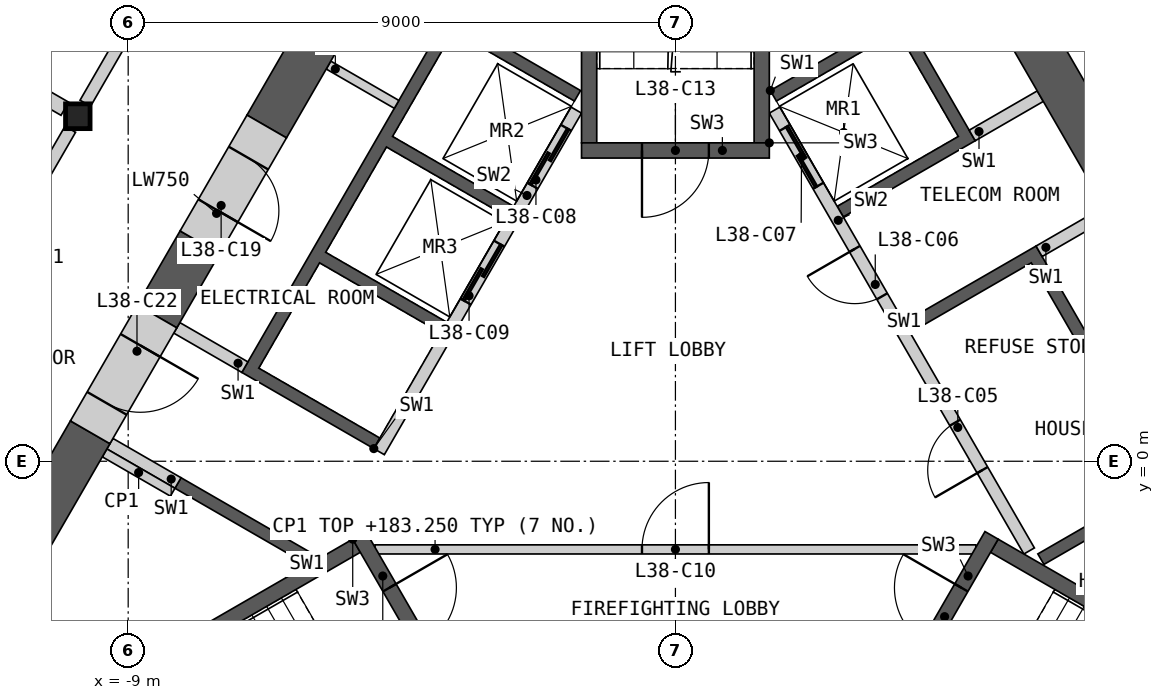
"""IFC4 building model, lengths in metres.
Left out: names, types, materials, properties, quantities, classifications, styles, units other than length and angle.
Written with IfcOpenShell. Run it as: python <this file> out.ifc"""

import sys

from ifc_helpers import new_model, si_unit, direction, frame, frame_2d, origin, origin_2d, place, context, subcontext, project, spatial, polyline, rectangle, i_section, outline, extrude, element, fill, save


model = new_model("IFC4")
c1 = context("Model", 3, precision=1e-05, world=origin(), true_north=direction((0.0, 1.0)))
c2 = subcontext(c1, "Body", "Model", "MODEL_VIEW")
j1 = project(units=[si_unit("LENGTHUNIT", "METRE"), si_unit("PLANEANGLEUNIT", "RADIAN")], contexts=[c1])
p1 = place(None, origin())
s1 = spatial("IfcSite", under=j1, at=p1, CompositionType="ELEMENT")
p2 = place(p1, origin())
s2 = spatial("IfcBuilding", under=s1, at=p2, CompositionType="ELEMENT")
p3 = place(p2, frame((0.0, 0.0, 180.0)))
s3 = spatial("IfcBuildingStorey", under=s2, at=p3, CompositionType="ELEMENT", Elevation=180.0)
p4 = place(p3, frame((-9.828, 5.675, 0.0), z_axis=(0.0, 0.0, 1.0), x_axis=(1.0, 0.0, 0.0)))
e1 = element("IfcColumn", 1, at=p4, inside=s3, PredefinedType="COLUMN", context=c2, shape_type="SweptSolid", body=[
    extrude(i_section(OverallWidth=0.404, OverallDepth=0.407, WebThickness=0.027, FlangeThickness=0.044, at=origin_2d()), origin(), (0.0, 0.0, 1.0), 3.6),
])
p5 = place(p3, origin())
e2 = element("IfcWall", 2, at=p5, inside=s3, PredefinedType="SHEAR", context=c2, shape_type="SweptSolid", body=[
    extrude(outline(polyline([(1.561, 6.097), (3.731, 7.35), (4.931, 5.272), (2.76, 4.019), (2.66, 4.192), (4.652, 5.342), (3.652, 7.074), (1.66, 5.924), (1.561, 6.097)])), origin(), (0.0, 0.0, 1.0), 3.25),
])
p6 = place(p3, origin())
e3 = element("IfcWall", 3, at=p6, inside=s3, PredefinedType="SHEAR", context=c2, shape_type="SweptSolid", body=[
    extrude(outline(polyline([(3.76, 2.287), (5.931, 3.54), (8.231, -0.444), (6.061, -1.697), (5.96, -1.524), (7.952, -0.374), (5.852, 3.263), (3.861, 2.113), (3.76, 2.287)])), origin(), (0.0, 0.0, 1.0), 3.25),
])
p7 = place(p3, frame((5.817, -1.476, 0.0), z_axis=(0.0, 0.0, 1.0), x_axis=(-0.500002616675, 0.866023893041, 0.0)))
e4 = element("IfcWall", 4, at=p7, inside=s3, PredefinedType="SOLIDWALL", context=c2, shape_type="SweptSolid", body=[
    extrude(rectangle(XDim=8.373, YDim=0.2, at=frame_2d((4.187, 0.0))), origin(), (0.0, 0.0, 1.0), 3.25),
])
p8 = place(p7, frame((1.537, 0.0, 0.0)))
e5 = element("IfcOpeningElement", 5, at=p8, cuts=e4, PredefinedType="OPENING", context=c2, shape_type="SweptSolid", body=[
    extrude(rectangle(XDim=0.9, YDim=2.1, at=frame_2d((0.45, 1.05))), frame((0.0, 0.11, 0.0), z_axis=(0.0, -1.0, 0.0), x_axis=(1.0, 0.0, 0.0)), (0.0, 0.0, 1.0), 0.22),
])
p9 = place(p7, frame((4.837, 0.0, 0.0)))
e6 = element("IfcOpeningElement", 6, at=p9, cuts=e4, PredefinedType="OPENING", context=c2, shape_type="SweptSolid", body=[
    extrude(rectangle(XDim=0.9, YDim=2.1, at=frame_2d((0.45, 1.05))), frame((0.0, 0.11, 0.0), z_axis=(0.0, -1.0, 0.0), x_axis=(1.0, 0.0, 0.0)), (0.0, 0.0, 1.0), 0.22),
])
p10 = place(p7, frame((6.937, 0.0, 0.0)))
e7 = element("IfcOpeningElement", 7, at=p10, cuts=e4, PredefinedType="OPENING", context=c2, shape_type="SweptSolid", body=[
    extrude(rectangle(XDim=1.1, YDim=2.1, at=frame_2d((0.55, 1.05))), frame((0.0, 0.11, 0.0), z_axis=(0.0, -1.0, 0.0), x_axis=(1.0, 0.0, 0.0)), (0.0, 0.0, 1.0), 0.22),
])
p11 = place(p3, frame((5.981, 3.453, 0.0), z_axis=(0.0, 0.0, 1.0), x_axis=(0.865968639725, 0.500098305348, 0.0)))
e8 = element("IfcWall", 8, at=p11, inside=s3, PredefinedType="SHEAR", context=c2, shape_type="SweptSolid", body=[
    extrude(rectangle(XDim=1.293, YDim=0.2, at=frame_2d((0.646, 0.0))), origin(), (0.0, 0.0, 1.0), 3.25),
])
p12 = place(p3, frame((4.881, 5.358, 0.0), z_axis=(0.0, 0.0, 1.0), x_axis=(0.866084958089, 0.499896834728, 0.0)))
e9 = element("IfcWall", 9, at=p12, inside=s3, PredefinedType="SHEAR", context=c2, shape_type="SweptSolid", body=[
    extrude(rectangle(XDim=1.293, YDim=0.2, at=frame_2d((0.646, 0.0))), origin(), (0.0, 0.0, 1.0), 3.25),
])
p13 = place(p3, origin())
e10 = element("IfcWall", 10, at=p13, inside=s3, PredefinedType="SHEAR", context=c2, shape_type="SweptSolid", body=[
    extrude(outline(polyline([(-6.061, -1.697), (-8.231, -0.444), (-8.131, -0.271), (-5.96, -1.524), (-6.061, -1.697)])), origin(), (0.0, 0.0, 1.0), 3.25),
])
p14 = place(p3, origin())
e11 = element("IfcWall", 11, at=p14, inside=s3, PredefinedType="SHEAR", context=c2, shape_type="SweptSolid", body=[
    extrude(outline(polyline([(-4.96, 0.208), (-7.131, 1.461), (-3.731, 7.35), (-1.561, 6.097), (-1.66, 5.924), (-3.652, 7.074), (-4.652, 5.342), (-2.66, 4.192), (-2.76, 4.019), (-4.752, 5.169), (-5.752, 3.437), (-3.76, 2.287), (-3.861, 2.113), (-5.852, 3.263), (-6.852, 1.531), (-4.861, 0.381), (-4.96, 0.208)])), origin(), (0.0, 0.0, 1.0), 3.25),
])
p15 = place(p3, frame((-1.631, 5.776, 0.0), z_axis=(0.0, 0.0, 1.0), x_axis=(-0.499992876559, -0.866029516466, 0.0)))
e12 = element("IfcWall", 12, at=p15, inside=s3, PredefinedType="SOLIDWALL", context=c2, shape_type="SweptSolid", body=[
    extrude(rectangle(XDim=6.486, YDim=0.2, at=frame_2d((3.243, 0.0))), origin(), (0.0, 0.0, 1.0), 3.25),
])
p16 = place(p15, frame((0.337, 0.0, 0.0)))
e13 = element("IfcOpeningElement", 13, at=p16, cuts=e12, PredefinedType="OPENING", context=c2, shape_type="SweptSolid", body=[
    extrude(rectangle(XDim=1.1, YDim=2.1, at=frame_2d((0.55, 1.05))), frame((0.0, 0.11, 0.0), z_axis=(0.0, -1.0, 0.0), x_axis=(1.0, 0.0, 0.0)), (0.0, 0.0, 1.0), 0.22),
])
p17 = place(p15, frame((2.537, 0.0, 0.0)))
e14 = element("IfcOpeningElement", 14, at=p17, cuts=e12, PredefinedType="OPENING", context=c2, shape_type="SweptSolid", body=[
    extrude(rectangle(XDim=1.1, YDim=2.1, at=frame_2d((0.55, 1.05))), frame((0.0, 0.11, 0.0), z_axis=(0.0, -1.0, 0.0), x_axis=(1.0, 0.0, 0.0)), (0.0, 0.0, 1.0), 0.22),
])
for number, where, z_axis, x_axis in (
    (15, (-7.081, 1.548, 0.0), (0.0, 0.0, 1.0), (-0.866, 0.5, 0.0)),
    (16, (-8.181, -0.357, 0.0), (0.0, 0.0, 1.0), (-0.866, 0.5, 0.0)),
):
    element("IfcWall", number, at=place(p3, frame(where, z_axis=z_axis, x_axis=x_axis)), inside=s3, PredefinedType="SHEAR", context=c2, shape_type="SweptSolid", body=[
        extrude(rectangle(XDim=1.293, YDim=0.2, at=frame_2d((0.646, 0.0))), origin(), (0.0, 0.0, 1.0), 3.25),
    ])
p18 = place(p3, frame((-4.941, -1.45, 0.0), z_axis=(0.0, 0.0, 1.0), x_axis=(1.0, 0.0, 0.0)))
e17 = element("IfcWall", 17, at=p18, inside=s3, PredefinedType="PARTITIONING", context=c2, shape_type="SweptSolid", body=[
    extrude(rectangle(XDim=9.882, YDim=0.15, at=frame_2d((4.941, 0.0))), origin(), (0.0, 0.0, 1.0), 3.25),
])
p19 = place(p18, frame((4.391, 0.0, 0.0)))
e18 = element("IfcOpeningElement", 18, at=p19, cuts=e17, PredefinedType="OPENING", context=c2, shape_type="SweptSolid", body=[
    extrude(rectangle(XDim=1.1, YDim=2.1, at=frame_2d((0.55, 1.05))), frame((0.0, 0.085, 0.0), z_axis=(0.0, -1.0, 0.0), x_axis=(1.0, 0.0, 0.0)), (0.0, 0.0, 1.0), 0.17),
])
p20 = place(p3, origin())
e19 = element("IfcWall", 19, at=p20, inside=s3, PredefinedType="SHEAR", context=c2, shape_type="SweptSolid", body=[
    extrude(outline(polyline([(-5.307, -1.281), (-10.374, -4.206), (-10.032, -4.298), (-5.182, -1.498), (-5.307, -1.281)])), origin(), (0.0, 0.0, 1.0), 3.25),
])
p21 = place(p3, frame((-5.199, -1.219, 0.0), z_axis=(0.0, 0.0, 1.0), x_axis=(0.499982516597, -0.866035497597, 0.0)))
e20 = element("IfcWall", 20, at=p21, inside=s3, PredefinedType="SHEAR", context=c2, shape_type="SweptSolid", body=[
    extrude(rectangle(XDim=3.088, YDim=0.25, at=frame_2d((1.544, 0.0))), origin(), (0.0, 0.0, 1.0), 3.25),
])
p22 = place(p21, frame((0.994, 0.0, 0.0)))
e21 = element("IfcOpeningElement", 21, at=p22, cuts=e20, PredefinedType="OPENING", context=c2, shape_type="SweptSolid", body=[
    extrude(rectangle(XDim=1.1, YDim=2.1, at=frame_2d((0.55, 1.05))), frame((0.0, 0.135, 0.0), z_axis=(0.0, -1.0, 0.0), x_axis=(1.0, 0.0, 0.0)), (0.0, 0.0, 1.0), 0.27),
])
p23 = place(p3, origin())
e22 = element("IfcWall", 22, at=p23, inside=s3, PredefinedType="SHEAR", context=c2, shape_type="SweptSolid", body=[
    extrude(outline(polyline([(10.032, -4.298), (10.374, -4.206), (5.307, -1.281), (5.182, -1.498), (10.032, -4.298)])), origin(), (0.0, 0.0, 1.0), 3.25),
])
p24 = place(p3, frame((3.655, -3.893, 0.0), z_axis=(0.0, 0.0, 1.0), x_axis=(0.499982516597, 0.866035497597, 0.0)))
e23 = element("IfcWall", 23, at=p24, inside=s3, PredefinedType="SHEAR", context=c2, shape_type="SweptSolid", body=[
    extrude(rectangle(XDim=3.088, YDim=0.25, at=frame_2d((1.544, 0.0))), origin(), (0.0, 0.0, 1.0), 3.25),
])
p25 = place(p24, frame((0.994, 0.0, 0.0)))
e24 = element("IfcOpeningElement", 24, at=p25, cuts=e23, PredefinedType="OPENING", context=c2, shape_type="SweptSolid", body=[
    extrude(rectangle(XDim=1.1, YDim=2.1, at=frame_2d((0.55, 1.05))), frame((0.0, 0.135, 0.0), z_axis=(0.0, -1.0, 0.0), x_axis=(1.0, 0.0, 0.0)), (0.0, 0.0, 1.0), 0.27),
])
p26 = place(p3, origin())
e25 = element("IfcWall", 25, at=p26, inside=s3, PredefinedType="SHEAR", context=c2, shape_type="SweptSolid", body=[
    extrude(outline(polyline([(1.544, 5.237), (1.544, 11.087), (1.294, 10.837), (1.294, 5.237), (1.544, 5.237)])), origin(), (0.0, 0.0, 1.0), 3.25),
])
p27 = place(p3, origin())
e26 = element("IfcWall", 26, at=p27, inside=s3, PredefinedType="SHEAR", context=c2, shape_type="SweptSolid", body=[
    extrude(outline(polyline([(-1.294, 10.837), (-1.544, 11.087), (-1.544, 5.237), (-1.294, 5.237), (-1.294, 10.837)])), origin(), (0.0, 0.0, 1.0), 3.25),
])
p28 = place(p3, frame((1.544, 5.112, 0.0), z_axis=(0.0, 0.0, 1.0), x_axis=(-1.0, 0.0, 0.0)))
e27 = element("IfcWall", 27, at=p28, inside=s3, PredefinedType="SHEAR", context=c2, shape_type="SweptSolid", body=[
    extrude(rectangle(XDim=3.088, YDim=0.25, at=frame_2d((1.544, 0.0))), origin(), (0.0, 0.0, 1.0), 3.25),
])
p29 = place(p28, frame((0.994, 0.0, 0.0)))
e28 = element("IfcOpeningElement", 28, at=p29, cuts=e27, PredefinedType="OPENING", context=c2, shape_type="SweptSolid", body=[
    extrude(rectangle(XDim=1.1, YDim=2.1, at=frame_2d((0.55, 1.05))), frame((0.0, 0.135, 0.0), z_axis=(0.0, -1.0, 0.0), x_axis=(1.0, 0.0, 0.0)), (0.0, 0.0, 1.0), 0.27),
])
for number, where, z_axis, x_axis in (
    (29, (-8.268, -0.509, 0.0), (0.0, 0.0, 1.0), (-0.866, 0.5, 0.0)),
    (30, (-5.705, 6.516, 0.0), (0.0, 0.0, 1.0), (0.866, -0.5, 0.0)),
):
    element("IfcWall", number, at=place(p3, frame(where, z_axis=z_axis, x_axis=x_axis)), inside=s3, PredefinedType="PARTITIONING", context=c2, shape_type="SweptSolid", body=[
        extrude(rectangle(XDim=1.293, YDim=0.15, at=frame_2d((0.646, 0.0))), origin(), (0.0, 0.0, 1.0), 3.25),
    ])
p30 = place(p3, frame((7.964, 3.354, 0.0), z_axis=(0.0, 0.0, 1.0), x_axis=(-0.50002928721, 0.866008494146, 0.0)))
e31 = element("IfcWall", 31, at=p30, inside=s3, PredefinedType="SHEAR", context=c2, shape_type="SweptSolid", body=[
    extrude(rectangle(XDim=6.405, YDim=0.75, at=frame_2d((3.203, 0.0))), origin(), (0.0, 0.0, 1.0), 3.25),
])
p31 = place(p3, frame((-9.625, 0.477, 0.0), z_axis=(0.0, 0.0, 1.0), x_axis=(-0.499986234705, -0.866033351035, 0.0)))
e32 = element("IfcWall", 32, at=p31, inside=s3, PredefinedType="SHEAR", context=c2, shape_type="SweptSolid", body=[
    extrude(rectangle(XDim=9.801, YDim=0.75, at=frame_2d((4.9, 0.0))), origin(), (0.0, 0.0, 1.0), 3.25),
])
p32 = place(p3, frame((-2.622, 12.606, 0.0), z_axis=(0.0, 0.0, 1.0), x_axis=(-0.500014611105, -0.866016967894, 0.0)))
e33 = element("IfcWall", 33, at=p32, inside=s3, PredefinedType="SHEAR", context=c2, shape_type="SweptSolid", body=[
    extrude(rectangle(XDim=8.198, YDim=0.75, at=frame_2d((4.099, 0.0))), origin(), (0.0, 0.0, 1.0), 3.25),
])
p33 = place(p3, frame((-7.821, 3.601, 0.0), z_axis=(0.0, 0.0, 1.0), x_axis=(-0.49996263964, -0.866046972724, 0.0)))
e34 = element("IfcWall", 34, at=p33, inside=s3, PredefinedType="SHEAR", context=c2, shape_type="SweptSolid", body=[
    extrude(rectangle(XDim=1.408, YDim=0.75, at=frame_2d((0.704, 0.0))), origin(), (0.0, 0.0, 1.0), 3.25),
])
p34 = place(p3, frame((-6.721, 5.506, 0.0), z_axis=(0.0, 0.0, 1.0), x_axis=(-0.499946605688, -0.86605622881, 0.0)))
e35 = element("IfcWall", 35, at=p34, inside=s3, PredefinedType="SHEAR", context=c2, shape_type="SweptSolid", body=[
    extrude(rectangle(XDim=2.2, YDim=0.75, at=frame_2d((1.1, 0.0))), origin(), (0.0, 0.0, 1.0), 3.25),
])
p35 = place(p34, frame((0.6, 0.0, 0.0)))
e36 = element("IfcOpeningElement", 36, at=p35, cuts=e35, PredefinedType="OPENING", context=c2, shape_type="SweptSolid", body=[
    extrude(rectangle(XDim=1.0, YDim=2.1, at=frame_2d((0.5, 1.05))), frame((0.0, 0.385, 0.0), z_axis=(0.0, -1.0, 0.0), x_axis=(1.0, 0.0, 0.0)), (0.0, 0.0, 1.0), 0.77),
])
p36 = place(p3, frame((-8.525, 2.382, 0.0), z_axis=(0.0, 0.0, 1.0), x_axis=(-0.500077893725, -0.86598042715, 0.0)))
e37 = element("IfcWall", 37, at=p36, inside=s3, PredefinedType="SHEAR", context=c2, shape_type="SweptSolid", body=[
    extrude(rectangle(XDim=2.2, YDim=0.75, at=frame_2d((1.1, 0.0))), origin(), (0.0, 0.0, 1.0), 3.25),
])
p37 = place(p36, frame((0.55, 0.0, 0.0)))
e38 = element("IfcOpeningElement", 38, at=p37, cuts=e37, PredefinedType="OPENING", context=c2, shape_type="SweptSolid", body=[
    extrude(rectangle(XDim=1.1, YDim=2.1, at=frame_2d((0.55, 1.05))), frame((0.0, 0.385, 0.0), z_axis=(0.0, -1.0, 0.0), x_axis=(1.0, 0.0, 0.0)), (0.0, 0.0, 1.0), 0.77),
])
p38 = place(p3, frame((5.377, 19.385, 0.0), z_axis=(0.0, 0.0, 1.0), x_axis=(0.500000757641, -0.86602496636, 0.0)))
e39 = element("IfcWall", 39, at=p38, inside=s3, PredefinedType="PARTITIONING", context=c2, shape_type="SweptSolid", body=[
    extrude(rectangle(XDim=28.198, YDim=0.2, at=frame_2d((14.099, 0.0))), origin(), (0.0, 0.0, 1.0), 3.25),
])
p39 = place(p38, frame((22.735, 0.0, 0.0)))
e40 = element("IfcOpeningElement", 40, at=p39, cuts=e39, PredefinedType="OPENING", context=c2, shape_type="SweptSolid", body=[
    extrude(rectangle(XDim=1.8, YDim=2.1, at=frame_2d((0.9, 1.05))), frame((0.0, 0.11, 0.0), z_axis=(0.0, -1.0, 0.0), x_axis=(1.0, 0.0, 0.0)), (0.0, 0.0, 1.0), 0.22),
])
p40 = place(p38, frame((14.402, 0.0, 0.0)))
e41 = element("IfcOpeningElement", 41, at=p40, cuts=e39, PredefinedType="OPENING", context=c2, shape_type="SweptSolid", body=[
    extrude(rectangle(XDim=1.0, YDim=2.1, at=frame_2d((0.5, 1.05))), frame((0.0, 0.11, 0.0), z_axis=(0.0, -1.0, 0.0), x_axis=(1.0, 0.0, 0.0)), (0.0, 0.0, 1.0), 0.22),
])
p41 = place(p38, frame((12.796, 0.0, 0.0)))
e42 = element("IfcOpeningElement", 42, at=p41, cuts=e39, PredefinedType="OPENING", context=c2, shape_type="SweptSolid", body=[
    extrude(rectangle(XDim=1.0, YDim=2.1, at=frame_2d((0.5, 1.05))), frame((0.0, 0.11, 0.0), z_axis=(0.0, -1.0, 0.0), x_axis=(1.0, 0.0, 0.0)), (0.0, 0.0, 1.0), 0.22),
])
p42 = place(p38, frame((4.164, 0.0, 0.0)))
e43 = element("IfcOpeningElement", 43, at=p42, cuts=e39, PredefinedType="OPENING", context=c2, shape_type="SweptSolid", body=[
    extrude(rectangle(XDim=1.0, YDim=2.1, at=frame_2d((0.5, 1.05))), frame((0.0, 0.11, 0.0), z_axis=(0.0, -1.0, 0.0), x_axis=(1.0, 0.0, 0.0)), (0.0, 0.0, 1.0), 0.22),
])
p43 = place(p38, frame((1.452, 0.0, 0.0)))
e44 = element("IfcOpeningElement", 44, at=p43, cuts=e39, PredefinedType="OPENING", context=c2, shape_type="SweptSolid", body=[
    extrude(rectangle(XDim=0.95, YDim=2.1, at=frame_2d((0.475, 1.05))), frame((0.0, 0.11, 0.0), z_axis=(0.0, -1.0, 0.0), x_axis=(1.0, 0.0, 0.0)), (0.0, 0.0, 1.0), 0.22),
])
p44 = place(p3, frame((-21.0, 12.124, 0.0), z_axis=(0.0, 0.0, 1.0), x_axis=(0.866025883649, -0.499999168849, 0.0)))
e45 = element("IfcWall", 45, at=p44, inside=s3, PredefinedType="PARTITIONING", context=c2, shape_type="SweptSolid", body=[
    extrude(rectangle(XDim=12.652, YDim=0.25, at=frame_2d((6.326, 0.0))), origin(), (0.0, 0.0, 1.0), 2.404),
])
p45 = place(p3, frame((-9.705, 5.888, 0.0), z_axis=(0.0, 0.0, 1.0), x_axis=(0.50000393355, 0.866023132736, 0.0)))
e46 = element("IfcWall", 46, at=p45, inside=s3, PredefinedType="PARTITIONING", context=c2, shape_type="SweptSolid", body=[
    extrude(rectangle(XDim=9.335, YDim=0.2, at=frame_2d((4.667, 0.0))), origin(), (0.0, 0.0, 1.0), 3.25),
])
p46 = place(p45, frame((5.172, 0.0, 0.0)))
e47 = element("IfcOpeningElement", 47, at=p46, cuts=e46, PredefinedType="OPENING", context=c2, shape_type="SweptSolid", body=[
    extrude(rectangle(XDim=1.0, YDim=2.1, at=frame_2d((0.5, 1.05))), frame((0.0, 0.11, 0.0), z_axis=(0.0, -1.0, 0.0), x_axis=(1.0, 0.0, 0.0)), (0.0, 0.0, 1.0), 0.22),
])
p47 = place(p45, frame((3.565, 0.0, 0.0)))
e48 = element("IfcOpeningElement", 48, at=p47, cuts=e46, PredefinedType="OPENING", context=c2, shape_type="SweptSolid", body=[
    extrude(rectangle(XDim=1.0, YDim=2.1, at=frame_2d((0.5, 1.05))), frame((0.0, 0.11, 0.0), z_axis=(0.0, -1.0, 0.0), x_axis=(1.0, 0.0, 0.0)), (0.0, 0.0, 1.0), 0.22),
])
p48 = place(p3, frame((-14.619, -2.624, 0.0), z_axis=(0.0, 0.0, 1.0), x_axis=(0.50000393355, 0.866023132736, 0.0)))
e49 = element("IfcWall", 49, at=p48, inside=s3, PredefinedType="PARTITIONING", context=c2, shape_type="SweptSolid", body=[
    extrude(rectangle(XDim=9.335, YDim=0.2, at=frame_2d((4.667, 0.0))), origin(), (0.0, 0.0, 1.0), 3.25),
])
p49 = place(p48, frame((4.77, 0.0, 0.0)))
e50 = element("IfcOpeningElement", 50, at=p49, cuts=e49, PredefinedType="OPENING", context=c2, shape_type="SweptSolid", body=[
    extrude(rectangle(XDim=1.0, YDim=2.1, at=frame_2d((0.5, 1.05))), frame((0.0, 0.11, 0.0), z_axis=(0.0, -1.0, 0.0), x_axis=(1.0, 0.0, 0.0)), (0.0, 0.0, 1.0), 0.22),
])
p50 = place(p48, frame((3.163, 0.0, 0.0)))
e51 = element("IfcOpeningElement", 51, at=p50, cuts=e49, PredefinedType="OPENING", context=c2, shape_type="SweptSolid", body=[
    extrude(rectangle(XDim=1.0, YDim=2.1, at=frame_2d((0.5, 1.05))), frame((0.0, 0.11, 0.0), z_axis=(0.0, -1.0, 0.0), x_axis=(1.0, 0.0, 0.0)), (0.0, 0.0, 1.0), 0.22),
])
p51 = place(p8, origin())
e52 = element("IfcDoor", 52, at=p51, inside=s3, OperationType="SINGLE_SWING_LEFT", PredefinedType="DOOR", context=c2, shape_type="SweptSolid", body=[
    extrude(rectangle(XDim=0.9, YDim=2.1, at=frame_2d((0.45, 1.05))), frame((0.0, 0.025, 0.0), z_axis=(0.0, -1.0, 0.0), x_axis=(1.0, 0.0, 0.0)), (0.0, 0.0, 1.0), 0.05),
])
fill(e5, e52)
p52 = place(p9, origin())
e53 = element("IfcDoor", 53, at=p52, inside=s3, OperationType="SINGLE_SWING_RIGHT", PredefinedType="DOOR", context=c2, shape_type="SweptSolid", body=[
    extrude(rectangle(XDim=0.9, YDim=2.1, at=frame_2d((0.45, 1.05))), frame((0.0, 0.025, 0.0), z_axis=(0.0, -1.0, 0.0), x_axis=(1.0, 0.0, 0.0)), (0.0, 0.0, 1.0), 0.05),
])
fill(e6, e53)
p53 = place(p10, origin())
e54 = element("IfcDoor", 54, at=p53, inside=s3, OperationType="SLIDING_TO_LEFT", PredefinedType="DOOR", context=c2, shape_type="SweptSolid", body=[
    extrude(rectangle(XDim=1.1, YDim=2.1, at=frame_2d((0.55, 1.05))), frame((0.0, 0.025, 0.0), z_axis=(0.0, -1.0, 0.0), x_axis=(1.0, 0.0, 0.0)), (0.0, 0.0, 1.0), 0.05),
])
fill(e7, e54)
p54 = place(p16, origin())
e55 = element("IfcDoor", 55, at=p54, inside=s3, OperationType="SLIDING_TO_LEFT", PredefinedType="DOOR", context=c2, shape_type="SweptSolid", body=[
    extrude(rectangle(XDim=1.1, YDim=2.1, at=frame_2d((0.55, 1.05))), frame((0.0, 0.025, 0.0), z_axis=(0.0, -1.0, 0.0), x_axis=(1.0, 0.0, 0.0)), (0.0, 0.0, 1.0), 0.05),
])
fill(e13, e55)
p55 = place(p17, origin())
e56 = element("IfcDoor", 56, at=p55, inside=s3, OperationType="SLIDING_TO_LEFT", PredefinedType="DOOR", context=c2, shape_type="SweptSolid", body=[
    extrude(rectangle(XDim=1.1, YDim=2.1, at=frame_2d((0.55, 1.05))), frame((0.0, 0.025, 0.0), z_axis=(0.0, -1.0, 0.0), x_axis=(1.0, 0.0, 0.0)), (0.0, 0.0, 1.0), 0.05),
])
fill(e14, e56)
p56 = place(p19, origin())
e57 = element("IfcDoor", 57, at=p56, inside=s3, OperationType="SINGLE_SWING_RIGHT", PredefinedType="DOOR", context=c2, shape_type="SweptSolid", body=[
    extrude(rectangle(XDim=1.1, YDim=2.1, at=frame_2d((0.55, 1.05))), frame((0.0, 0.025, 0.0), z_axis=(0.0, -1.0, 0.0), x_axis=(1.0, 0.0, 0.0)), (0.0, 0.0, 1.0), 0.05),
])
fill(e18, e57)
p57 = place(p22, origin())
e58 = element("IfcDoor", 58, at=p57, inside=s3, OperationType="SINGLE_SWING_LEFT", PredefinedType="DOOR", context=c2, shape_type="SweptSolid", body=[
    extrude(rectangle(XDim=1.1, YDim=2.1, at=frame_2d((0.55, 1.05))), frame((0.0, 0.025, 0.0), z_axis=(0.0, -1.0, 0.0), x_axis=(1.0, 0.0, 0.0)), (0.0, 0.0, 1.0), 0.05),
])
fill(e21, e58)
p58 = place(p25, origin())
e59 = element("IfcDoor", 59, at=p58, inside=s3, OperationType="SINGLE_SWING_RIGHT", PredefinedType="DOOR", context=c2, shape_type="SweptSolid", body=[
    extrude(rectangle(XDim=1.1, YDim=2.1, at=frame_2d((0.55, 1.05))), frame((0.0, 0.025, 0.0), z_axis=(0.0, -1.0, 0.0), x_axis=(1.0, 0.0, 0.0)), (0.0, 0.0, 1.0), 0.05),
])
fill(e24, e59)
p59 = place(p29, origin())
e60 = element("IfcDoor", 60, at=p59, inside=s3, OperationType="SINGLE_SWING_RIGHT", PredefinedType="DOOR", context=c2, shape_type="SweptSolid", body=[
    extrude(rectangle(XDim=1.1, YDim=2.1, at=frame_2d((0.55, 1.05))), frame((0.0, 0.025, 0.0), z_axis=(0.0, -1.0, 0.0), x_axis=(1.0, 0.0, 0.0)), (0.0, 0.0, 1.0), 0.05),
])
fill(e28, e60)
p60 = place(p35, origin())
e61 = element("IfcDoor", 61, at=p60, inside=s3, OperationType="SINGLE_SWING_RIGHT", PredefinedType="DOOR", context=c2, shape_type="SweptSolid", body=[
    extrude(rectangle(XDim=1.0, YDim=2.1, at=frame_2d((0.5, 1.05))), frame((0.0, 0.13, 0.0), z_axis=(0.0, -1.0, 0.0), x_axis=(1.0, 0.0, 0.0)), (0.0, 0.0, 1.0), 0.05),
])
fill(e36, e61)
p61 = place(p37, origin())
e62 = element("IfcDoor", 62, at=p61, inside=s3, OperationType="SINGLE_SWING_LEFT", PredefinedType="DOOR", context=c2, shape_type="SweptSolid", body=[
    extrude(rectangle(XDim=1.1, YDim=2.1, at=frame_2d((0.55, 1.05))), frame((0.0, 0.13, 0.0), z_axis=(0.0, -1.0, 0.0), x_axis=(1.0, 0.0, 0.0)), (0.0, 0.0, 1.0), 0.05),
])
fill(e38, e62)
save(model, sys.argv[1])
